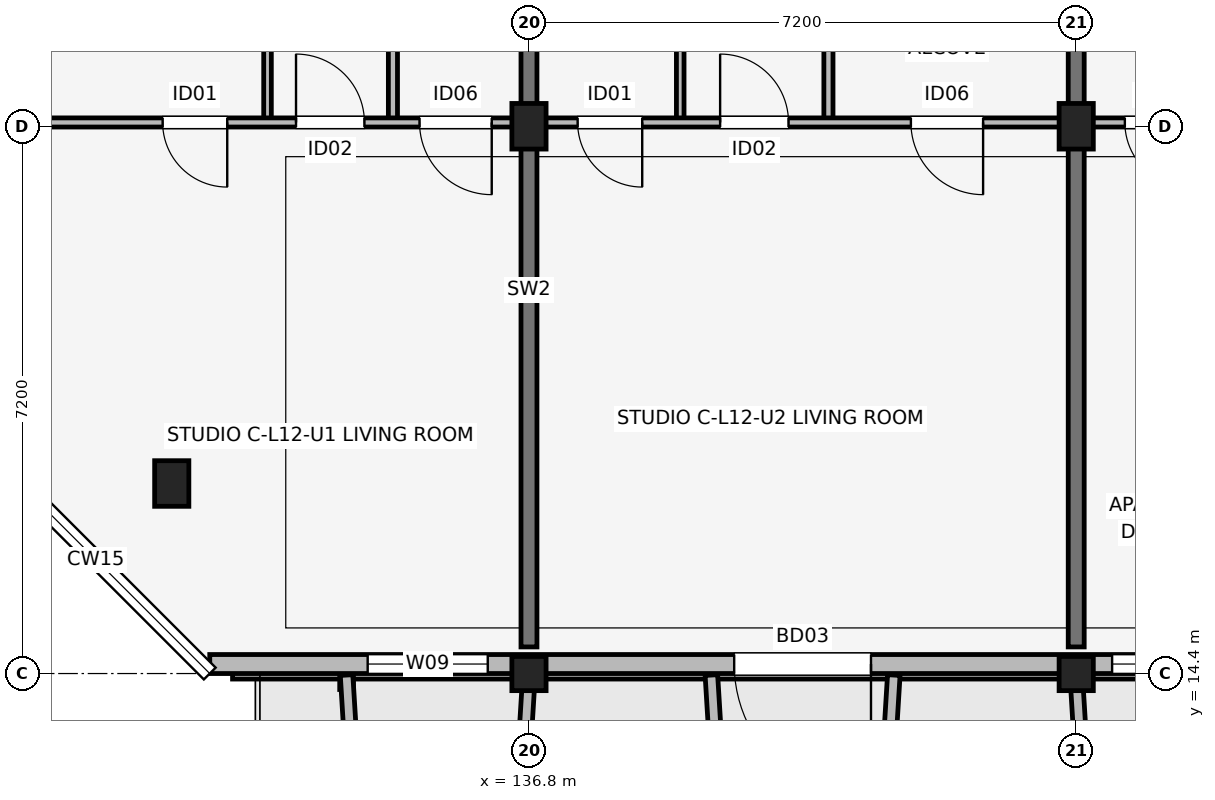
"""IFC4 building model, lengths in metres.
Left out: names, types, materials, properties, quantities, classifications, styles, units other than length and angle.
Written with IfcOpenShell. Run it as: python <this file> out.ifc"""

import sys

from ifc_helpers import new_model, si_unit, direction, frame, frame_2d, origin, origin_2d, place, context, subcontext, project, spatial, rectangle, extrude, element, fill, save


model = new_model("IFC4")
c1 = context("Model", 3, precision=1e-05, world=origin(), true_north=direction((0.0, 1.0)))
c2 = subcontext(c1, "Body", "Model", "MODEL_VIEW")
j1 = project(units=[si_unit("LENGTHUNIT", "METRE"), si_unit("PLANEANGLEUNIT", "RADIAN")], contexts=[c1])
p1 = place(None, origin())
s1 = spatial("IfcSite", under=j1, at=p1, CompositionType="ELEMENT")
p2 = place(p1, origin())
s2 = spatial("IfcBuilding", under=s1, at=p2, CompositionType="ELEMENT")
p3 = place(p2, frame((0.0, 0.0, 40.2)))
s3 = spatial("IfcBuildingStorey", under=s2, at=p3, CompositionType="ELEMENT", Elevation=40.2)
p4 = place(p3, frame((132.1, 16.9, 0.0), z_axis=(0.0, 0.0, 1.0), x_axis=(1.0, 0.0, 0.0)))
e1 = element("IfcColumn", 1, at=p4, inside=s3, PredefinedType="COLUMN", context=c2, shape_type="SweptSolid", body=[
    extrude(rectangle(XDim=0.45, YDim=0.6, at=origin_2d()), origin(), (0.0, 0.0, 1.0), 3.15),
])
p5 = place(p3, frame((136.8, 14.4, 0.0), z_axis=(0.0, 0.0, 1.0), x_axis=(1.0, 0.0, 0.0)))
e2 = element("IfcColumn", 2, at=p5, inside=s3, PredefinedType="COLUMN", context=c2, shape_type="SweptSolid", body=[
    extrude(rectangle(XDim=0.45, YDim=0.45, at=origin_2d()), origin(), (0.0, 0.0, 1.0), 3.15),
])
p6 = place(p3, frame((136.8, 21.6, 0.0), z_axis=(0.0, 0.0, 1.0), x_axis=(1.0, 0.0, 0.0)))
e3 = element("IfcColumn", 3, at=p6, inside=s3, PredefinedType="COLUMN", context=c2, shape_type="SweptSolid", body=[
    extrude(rectangle(XDim=0.45, YDim=0.6, at=origin_2d()), origin(), (0.0, 0.0, 1.0), 3.15),
])
p7 = place(p3, frame((144.0, 14.4, 0.0), z_axis=(0.0, 0.0, 1.0), x_axis=(1.0, 0.0, 0.0)))
e4 = element("IfcColumn", 4, at=p7, inside=s3, PredefinedType="COLUMN", context=c2, shape_type="SweptSolid", body=[
    extrude(rectangle(XDim=0.45, YDim=0.45, at=origin_2d()), origin(), (0.0, 0.0, 1.0), 3.15),
])
p8 = place(p3, frame((144.0, 21.6, 0.0), z_axis=(0.0, 0.0, 1.0), x_axis=(1.0, 0.0, 0.0)))
e5 = element("IfcColumn", 5, at=p8, inside=s3, PredefinedType="COLUMN", context=c2, shape_type="SweptSolid", body=[
    extrude(rectangle(XDim=0.45, YDim=0.6, at=origin_2d()), origin(), (0.0, 0.0, 1.0), 3.15),
])
for number, where, z_axis, x_axis in (
    (6, (136.8, 14.75, 0.0), (0.0, 0.0, 1.0), (0.0, 1.0, 0.0)),
    (7, (144.0, 14.75, 0.0), (0.0, 0.0, 1.0), (0.0, 1.0, 0.0)),
):
    element("IfcWall", number, at=place(p3, frame(where, z_axis=z_axis, x_axis=x_axis)), inside=s3, PredefinedType="SHEAR", context=c2, shape_type="SweptSolid", body=[
        extrude(rectangle(XDim=9.4, YDim=0.21, at=frame_2d((4.7, 0.0))), origin(), (0.0, 0.0, 1.0), 3.15),
    ])
p9 = place(p3, frame((132.6, 14.525, 0.0), z_axis=(0.0, 0.0, 1.0), x_axis=(1.0, 0.0, 0.0)))
e8 = element("IfcWall", 8, at=p9, inside=s3, PredefinedType="SOLIDWALL", context=c2, shape_type="SweptSolid", body=[
    extrude(rectangle(XDim=30.0, YDim=0.25, at=frame_2d((15.0, 0.0))), origin(), (0.0, 0.0, 1.0), 2.48),
])
p10 = place(p9, frame((8.7, 0.0, 0.0), z_axis=(0.0, 0.0, 1.0), x_axis=(-1.0, 0.0, 0.0)))
e9 = element("IfcOpeningElement", 9, at=p10, cuts=e8, PredefinedType="OPENING", context=c2, shape_type="SweptSolid", body=[
    extrude(rectangle(XDim=1.8, YDim=2.15, at=frame_2d((0.9, 1.075))), frame((0.0, 0.135, 0.0), z_axis=(0.0, -1.0, 0.0), x_axis=(1.0, 0.0, 0.0)), (0.0, 0.0, 1.0), 0.27),
])
p11 = place(p9, frame((23.025, 0.0, 0.0), z_axis=(0.0, 0.0, 1.0), x_axis=(-1.0, 0.0, 0.0)))
e10 = element("IfcOpeningElement", 10, at=p11, cuts=e8, PredefinedType="OPENING", context=c2, shape_type="SweptSolid", body=[
    extrude(rectangle(XDim=1.65, YDim=2.15, at=frame_2d((0.825, 1.075))), frame((0.0, 0.135, 0.0), z_axis=(0.0, -1.0, 0.0), x_axis=(1.0, 0.0, 0.0)), (0.0, 0.0, 1.0), 0.27),
])
p12 = place(p9, frame((2.077, 0.0, 0.7)))
e11 = element("IfcOpeningElement", 11, at=p12, cuts=e8, PredefinedType="OPENING", context=c2, shape_type="SweptSolid", body=[
    extrude(rectangle(XDim=1.58, YDim=1.6, at=frame_2d((0.79, 0.8))), frame((0.0, 0.135, 0.0), z_axis=(0.0, -1.0, 0.0), x_axis=(1.0, 0.0, 0.0)), (0.0, 0.0, 1.0), 0.27),
])
p13 = place(p9, frame((11.873, 0.0, 0.7)))
e12 = element("IfcOpeningElement", 12, at=p13, cuts=e8, PredefinedType="OPENING", context=c2, shape_type="SweptSolid", body=[
    extrude(rectangle(XDim=1.72, YDim=1.6, at=frame_2d((0.86, 0.8))), frame((0.0, 0.135, 0.0), z_axis=(0.0, -1.0, 0.0), x_axis=(1.0, 0.0, 0.0)), (0.0, 0.0, 1.0), 0.27),
])
p14 = place(p9, frame((16.968, 0.0, 0.75)))
e13 = element("IfcOpeningElement", 13, at=p14, cuts=e8, PredefinedType="OPENING", context=c2, shape_type="SweptSolid", body=[
    extrude(rectangle(XDim=0.6, YDim=1.25, at=frame_2d((0.3, 0.625))), frame((0.0, 0.135, 0.0), z_axis=(0.0, -1.0, 0.0), x_axis=(1.0, 0.0, 0.0)), (0.0, 0.0, 1.0), 0.27),
])
p15 = place(p9, frame((19.363, 0.0, 0.75)))
e14 = element("IfcOpeningElement", 14, at=p15, cuts=e8, PredefinedType="OPENING", context=c2, shape_type="SweptSolid", body=[
    extrude(rectangle(XDim=0.72, YDim=1.35, at=frame_2d((0.36, 0.675))), frame((0.0, 0.135, 0.0), z_axis=(0.0, -1.0, 0.0), x_axis=(1.0, 0.0, 0.0)), (0.0, 0.0, 1.0), 0.27),
])
p16 = place(p9, frame((26.498, 0.0, 0.75)))
e15 = element("IfcOpeningElement", 15, at=p16, cuts=e8, PredefinedType="OPENING", context=c2, shape_type="SweptSolid", body=[
    extrude(rectangle(XDim=0.85, YDim=1.4, at=frame_2d((0.425, 0.7))), frame((0.0, 0.135, 0.0), z_axis=(0.0, -1.0, 0.0), x_axis=(1.0, 0.0, 0.0)), (0.0, 0.0, 1.0), 0.27),
])
p17 = place(p9, frame((28.525, 0.0, 0.75)))
e16 = element("IfcOpeningElement", 16, at=p17, cuts=e8, PredefinedType="OPENING", context=c2, shape_type="SweptSolid", body=[
    extrude(rectangle(XDim=0.98, YDim=1.45, at=frame_2d((0.49, 0.725))), frame((0.0, 0.135, 0.0), z_axis=(0.0, -1.0, 0.0), x_axis=(1.0, 0.0, 0.0)), (0.0, 0.0, 1.0), 0.27),
])
p18 = place(p3, frame((134.4, 14.38, 0.0), z_axis=(0.0, 0.0, 1.0), x_axis=(0.061170732449, -0.998127317276, 0.0)))
e17 = element("IfcWall", 17, at=p18, inside=s3, PredefinedType="ELEMENTEDWALL", context=c2, shape_type="SweptSolid", body=[
    extrude(rectangle(XDim=1.964, YDim=0.165, at=frame_2d((0.982, 0.0))), origin(), (0.0, 0.0, 1.0), 2.8),
])
p19 = place(p3, frame((136.8, 14.38, 0.0), z_axis=(0.0, 0.0, 1.0), x_axis=(-0.061170732449, -0.998127317276, 0.0)))
e18 = element("IfcWall", 18, at=p19, inside=s3, PredefinedType="ELEMENTEDWALL", context=c2, shape_type="SweptSolid", body=[
    extrude(rectangle(XDim=1.964, YDim=0.165, at=frame_2d((0.982, 0.0))), origin(), (0.0, 0.0, 1.0), 2.48),
])
for number, where, z_axis, x_axis in (
    (19, (139.2, 14.38, 0.0), (0.0, 0.0, 1.0), (0.061, -0.998, 0.0)),
    (20, (141.6, 14.38, 0.0), (0.0, 0.0, 1.0), (-0.061, -0.998, 0.0)),
):
    element("IfcWall", number, at=place(p3, frame(where, z_axis=z_axis, x_axis=x_axis)), inside=s3, PredefinedType="ELEMENTEDWALL", context=c2, shape_type="SweptSolid", body=[
        extrude(rectangle(XDim=1.964, YDim=0.165, at=frame_2d((0.982, 0.0))), origin(), (0.0, 0.0, 1.0), 2.58),
    ])
p20 = place(p3, frame((144.0, 14.38, 0.0), z_axis=(0.0, 0.0, 1.0), x_axis=(0.061170732449, -0.998127317276, 0.0)))
e21 = element("IfcWall", 21, at=p20, inside=s3, PredefinedType="ELEMENTEDWALL", context=c2, shape_type="SweptSolid", body=[
    extrude(rectangle(XDim=1.964, YDim=0.165, at=frame_2d((0.982, 0.0))), origin(), (0.0, 0.0, 1.0), 2.48),
])
p21 = place(p3, frame((133.36, 21.65, 0.0), z_axis=(0.0, 0.0, 1.0), x_axis=(0.0, 1.0, 0.0)))
e22 = element("IfcWall", 22, at=p21, inside=s3, PredefinedType="PARTITIONING", context=c2, shape_type="SweptSolid", body=[
    extrude(rectangle(XDim=2.65, YDim=0.1, at=frame_2d((1.325, 0.0))), origin(), (0.0, 0.0, 1.0), 2.38),
])
p22 = place(p3, frame((135.01, 21.65, 0.0), z_axis=(0.0, 0.0, 1.0), x_axis=(0.0, 1.0, 0.0)))
e23 = element("IfcWall", 23, at=p22, inside=s3, PredefinedType="PARTITIONING", context=c2, shape_type="SweptSolid", body=[
    extrude(rectangle(XDim=2.65, YDim=0.12, at=frame_2d((1.325, 0.0))), origin(), (0.0, 0.0, 1.0), 2.38),
])
p23 = place(p3, frame((129.74, 21.65, 0.0), z_axis=(0.0, 0.0, 1.0), x_axis=(1.0, 0.0, 0.0)))
e24 = element("IfcWall", 24, at=p23, inside=s3, PredefinedType="PARTITIONING", context=c2, shape_type="SweptSolid", body=[
    extrude(rectangle(XDim=6.92, YDim=0.12, at=frame_2d((3.46, 0.0))), origin(), (0.0, 0.0, 1.0), 2.38),
])
p24 = place(p23, frame((3.09, 0.0, 0.0), z_axis=(0.0, 0.0, 1.0), x_axis=(-1.0, 0.0, 0.0)))
e25 = element("IfcOpeningElement", 25, at=p24, cuts=e24, PredefinedType="OPENING", context=c2, shape_type="SweptSolid", body=[
    extrude(rectangle(XDim=0.85, YDim=2.08, at=frame_2d((0.425, 1.04))), frame((0.0, 0.07, 0.0), z_axis=(0.0, -1.0, 0.0), x_axis=(1.0, 0.0, 0.0)), (0.0, 0.0, 1.0), 0.14),
])
p25 = place(p23, frame((3.995, 0.0, 0.0)))
e26 = element("IfcOpeningElement", 26, at=p25, cuts=e24, PredefinedType="OPENING", context=c2, shape_type="SweptSolid", body=[
    extrude(rectangle(XDim=0.9, YDim=2.08, at=frame_2d((0.45, 1.04))), frame((0.0, 0.07, 0.0), z_axis=(0.0, -1.0, 0.0), x_axis=(1.0, 0.0, 0.0)), (0.0, 0.0, 1.0), 0.14),
])
p26 = place(p23, frame((6.57, 0.0, 0.0), z_axis=(0.0, 0.0, 1.0), x_axis=(-1.0, 0.0, 0.0)))
e27 = element("IfcOpeningElement", 27, at=p26, cuts=e24, PredefinedType="OPENING", context=c2, shape_type="SweptSolid", body=[
    extrude(rectangle(XDim=0.95, YDim=2.08, at=frame_2d((0.475, 1.04))), frame((0.0, 0.07, 0.0), z_axis=(0.0, -1.0, 0.0), x_axis=(1.0, 0.0, 0.0)), (0.0, 0.0, 1.0), 0.14),
])
p27 = place(p3, frame((138.79, 21.65, 0.0), z_axis=(0.0, 0.0, 1.0), x_axis=(0.0, 1.0, 0.0)))
e28 = element("IfcWall", 28, at=p27, inside=s3, PredefinedType="PARTITIONING", context=c2, shape_type="SweptSolid", body=[
    extrude(rectangle(XDim=2.65, YDim=0.1, at=frame_2d((1.325, 0.0))), origin(), (0.0, 0.0, 1.0), 2.38),
])
p28 = place(p3, frame((140.74, 21.65, 0.0), z_axis=(0.0, 0.0, 1.0), x_axis=(0.0, 1.0, 0.0)))
e29 = element("IfcWall", 29, at=p28, inside=s3, PredefinedType="PARTITIONING", context=c2, shape_type="SweptSolid", body=[
    extrude(rectangle(XDim=2.65, YDim=0.12, at=frame_2d((1.325, 0.0))), origin(), (0.0, 0.0, 1.0), 2.38),
])
p29 = place(p3, frame((136.94, 21.65, 0.0), z_axis=(0.0, 0.0, 1.0), x_axis=(1.0, 0.0, 0.0)))
e30 = element("IfcWall", 30, at=p29, inside=s3, PredefinedType="PARTITIONING", context=c2, shape_type="SweptSolid", body=[
    extrude(rectangle(XDim=6.92, YDim=0.12, at=frame_2d((3.46, 0.0))), origin(), (0.0, 0.0, 1.0), 2.38),
])
p30 = place(p29, frame((1.35, 0.0, 0.0), z_axis=(0.0, 0.0, 1.0), x_axis=(-1.0, 0.0, 0.0)))
e31 = element("IfcOpeningElement", 31, at=p30, cuts=e30, PredefinedType="OPENING", context=c2, shape_type="SweptSolid", body=[
    extrude(rectangle(XDim=0.85, YDim=2.08, at=frame_2d((0.425, 1.04))), frame((0.0, 0.07, 0.0), z_axis=(0.0, -1.0, 0.0), x_axis=(1.0, 0.0, 0.0)), (0.0, 0.0, 1.0), 0.14),
])
p31 = place(p29, frame((2.375, 0.0, 0.0)))
e32 = element("IfcOpeningElement", 32, at=p31, cuts=e30, PredefinedType="OPENING", context=c2, shape_type="SweptSolid", body=[
    extrude(rectangle(XDim=0.9, YDim=2.08, at=frame_2d((0.45, 1.04))), frame((0.0, 0.07, 0.0), z_axis=(0.0, -1.0, 0.0), x_axis=(1.0, 0.0, 0.0)), (0.0, 0.0, 1.0), 0.14),
])
p32 = place(p29, frame((5.835, 0.0, 0.0), z_axis=(0.0, 0.0, 1.0), x_axis=(-1.0, 0.0, 0.0)))
e33 = element("IfcOpeningElement", 33, at=p32, cuts=e30, PredefinedType="OPENING", context=c2, shape_type="SweptSolid", body=[
    extrude(rectangle(XDim=0.95, YDim=2.08, at=frame_2d((0.475, 1.04))), frame((0.0, 0.07, 0.0), z_axis=(0.0, -1.0, 0.0), x_axis=(1.0, 0.0, 0.0)), (0.0, 0.0, 1.0), 0.14),
])
p33 = place(p3, frame((144.14, 21.65, 0.0), z_axis=(0.0, 0.0, 1.0), x_axis=(1.0, 0.0, 0.0)))
e34 = element("IfcWall", 34, at=p33, inside=s3, PredefinedType="PARTITIONING", context=c2, shape_type="SweptSolid", body=[
    extrude(rectangle(XDim=6.92, YDim=0.12, at=frame_2d((3.46, 0.0))), origin(), (0.0, 0.0, 1.0), 2.38),
])
p34 = place(p33, frame((1.35, 0.0, 0.0), z_axis=(0.0, 0.0, 1.0), x_axis=(-1.0, 0.0, 0.0)))
e35 = element("IfcOpeningElement", 35, at=p34, cuts=e34, PredefinedType="OPENING", context=c2, shape_type="SweptSolid", body=[
    extrude(rectangle(XDim=0.85, YDim=2.08, at=frame_2d((0.425, 1.04))), frame((0.0, 0.07, 0.0), z_axis=(0.0, -1.0, 0.0), x_axis=(1.0, 0.0, 0.0)), (0.0, 0.0, 1.0), 0.14),
])
p35 = place(p33, frame((2.525, 0.0, 0.0)))
e36 = element("IfcOpeningElement", 36, at=p35, cuts=e34, PredefinedType="OPENING", context=c2, shape_type="SweptSolid", body=[
    extrude(rectangle(XDim=0.9, YDim=2.08, at=frame_2d((0.45, 1.04))), frame((0.0, 0.07, 0.0), z_axis=(0.0, -1.0, 0.0), x_axis=(1.0, 0.0, 0.0)), (0.0, 0.0, 1.0), 0.14),
])
p36 = place(p33, frame((5.985, 0.0, 0.0), z_axis=(0.0, 0.0, 1.0), x_axis=(-1.0, 0.0, 0.0)))
e37 = element("IfcOpeningElement", 37, at=p36, cuts=e34, PredefinedType="OPENING", context=c2, shape_type="SweptSolid", body=[
    extrude(rectangle(XDim=0.95, YDim=2.08, at=frame_2d((0.475, 1.04))), frame((0.0, 0.07, 0.0), z_axis=(0.0, -1.0, 0.0), x_axis=(1.0, 0.0, 0.0)), (0.0, 0.0, 1.0), 0.14),
])
p37 = place(p10, origin())
e38 = element("IfcDoor", 38, at=p37, inside=s3, OperationType="SINGLE_SWING_RIGHT", PredefinedType="DOOR", context=c2, shape_type="SweptSolid", body=[
    extrude(rectangle(XDim=1.8, YDim=2.15, at=frame_2d((0.9, 1.075))), frame((0.0, 0.025, 0.0), z_axis=(0.0, -1.0, 0.0), x_axis=(1.0, 0.0, 0.0)), (0.0, 0.0, 1.0), 0.05),
])
fill(e9, e38)
p38 = place(p12, origin())
e39 = element("IfcWindow", 39, at=p38, inside=s3, PartitioningType="SINGLE_PANEL", PredefinedType="WINDOW", context=c2, shape_type="SweptSolid", body=[
    extrude(rectangle(XDim=1.58, YDim=1.6, at=frame_2d((0.79, 0.8))), frame((0.0, 0.03, 0.0), z_axis=(0.0, -1.0, 0.0), x_axis=(1.0, 0.0, 0.0)), (0.0, 0.0, 1.0), 0.06),
])
fill(e11, e39)
p39 = place(p13, origin())
e40 = element("IfcWindow", 40, at=p39, inside=s3, PartitioningType="SINGLE_PANEL", PredefinedType="WINDOW", context=c2, shape_type="SweptSolid", body=[
    extrude(rectangle(XDim=1.72, YDim=1.6, at=frame_2d((0.86, 0.8))), frame((0.0, 0.03, 0.0), z_axis=(0.0, -1.0, 0.0), x_axis=(1.0, 0.0, 0.0)), (0.0, 0.0, 1.0), 0.06),
])
fill(e12, e40)
p40 = place(p24, origin())
e41 = element("IfcDoor", 41, at=p40, inside=s3, OperationType="SINGLE_SWING_RIGHT", PredefinedType="DOOR", context=c2, shape_type="SweptSolid", body=[
    extrude(rectangle(XDim=0.85, YDim=2.08, at=frame_2d((0.425, 1.04))), frame((0.0, 0.025, 0.0), z_axis=(0.0, -1.0, 0.0), x_axis=(1.0, 0.0, 0.0)), (0.0, 0.0, 1.0), 0.05),
])
fill(e25, e41)
p41 = place(p25, origin())
e42 = element("IfcDoor", 42, at=p41, inside=s3, OperationType="SINGLE_SWING_LEFT", PredefinedType="DOOR", context=c2, shape_type="SweptSolid", body=[
    extrude(rectangle(XDim=0.9, YDim=2.08, at=frame_2d((0.45, 1.04))), frame((0.0, 0.025, 0.0), z_axis=(0.0, -1.0, 0.0), x_axis=(1.0, 0.0, 0.0)), (0.0, 0.0, 1.0), 0.05),
])
fill(e26, e42)
p42 = place(p26, origin())
e43 = element("IfcDoor", 43, at=p42, inside=s3, OperationType="SINGLE_SWING_RIGHT", PredefinedType="DOOR", context=c2, shape_type="SweptSolid", body=[
    extrude(rectangle(XDim=0.95, YDim=2.08, at=frame_2d((0.475, 1.04))), frame((0.0, 0.025, 0.0), z_axis=(0.0, -1.0, 0.0), x_axis=(1.0, 0.0, 0.0)), (0.0, 0.0, 1.0), 0.05),
])
fill(e27, e43)
p43 = place(p30, origin())
e44 = element("IfcDoor", 44, at=p43, inside=s3, OperationType="SINGLE_SWING_RIGHT", PredefinedType="DOOR", context=c2, shape_type="SweptSolid", body=[
    extrude(rectangle(XDim=0.85, YDim=2.08, at=frame_2d((0.425, 1.04))), frame((0.0, 0.025, 0.0), z_axis=(0.0, -1.0, 0.0), x_axis=(1.0, 0.0, 0.0)), (0.0, 0.0, 1.0), 0.05),
])
fill(e31, e44)
p44 = place(p31, origin())
e45 = element("IfcDoor", 45, at=p44, inside=s3, OperationType="SINGLE_SWING_LEFT", PredefinedType="DOOR", context=c2, shape_type="SweptSolid", body=[
    extrude(rectangle(XDim=0.9, YDim=2.08, at=frame_2d((0.45, 1.04))), frame((0.0, 0.025, 0.0), z_axis=(0.0, -1.0, 0.0), x_axis=(1.0, 0.0, 0.0)), (0.0, 0.0, 1.0), 0.05),
])
fill(e32, e45)
p45 = place(p32, origin())
e46 = element("IfcDoor", 46, at=p45, inside=s3, OperationType="SINGLE_SWING_RIGHT", PredefinedType="DOOR", context=c2, shape_type="SweptSolid", body=[
    extrude(rectangle(XDim=0.95, YDim=2.08, at=frame_2d((0.475, 1.04))), frame((0.0, 0.025, 0.0), z_axis=(0.0, -1.0, 0.0), x_axis=(1.0, 0.0, 0.0)), (0.0, 0.0, 1.0), 0.05),
])
fill(e33, e46)
p46 = place(p34, origin())
e47 = element("IfcDoor", 47, at=p46, inside=s3, OperationType="SINGLE_SWING_RIGHT", PredefinedType="DOOR", context=c2, shape_type="SweptSolid", body=[
    extrude(rectangle(XDim=0.85, YDim=2.08, at=frame_2d((0.425, 1.04))), frame((0.0, 0.025, 0.0), z_axis=(0.0, -1.0, 0.0), x_axis=(1.0, 0.0, 0.0)), (0.0, 0.0, 1.0), 0.05),
])
fill(e35, e47)
save(model, sys.argv[1])
